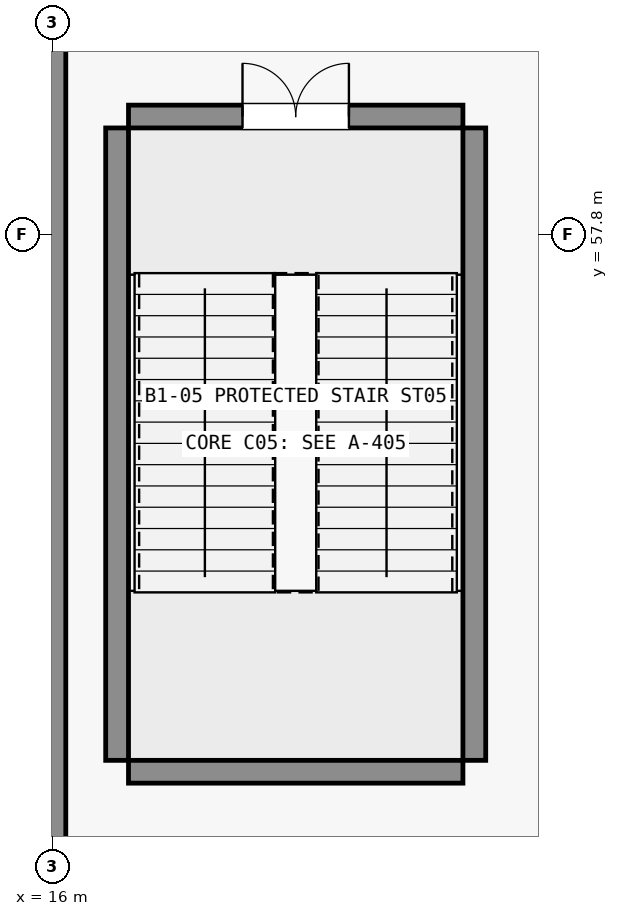
"""IFC4 building model, lengths in metres.
Left out: names, types, materials, properties, quantities, classifications, styles, units other than length and angle.
Written with IfcOpenShell. Run it as: python <this file> out.ifc"""

import sys

from ifc_helpers import new_model, si_unit, direction, frame, frame_2d, origin, place, context, subcontext, project, spatial, rectangle, extrude, element, fill, save


model = new_model("IFC4")
c1 = context("Model", 3, precision=1e-05, world=origin(), true_north=direction((0.0, 1.0)))
c2 = subcontext(c1, "Body", "Model", "MODEL_VIEW")
j1 = project(units=[si_unit("LENGTHUNIT", "METRE"), si_unit("PLANEANGLEUNIT", "RADIAN")], contexts=[c1])
p1 = place(None, origin())
s1 = spatial("IfcSite", under=j1, at=p1, CompositionType="ELEMENT")
p2 = place(p1, origin())
s2 = spatial("IfcBuilding", under=s1, at=p2, CompositionType="ELEMENT")
p3 = place(p2, frame((0.0, 0.0, -5.4)))
s3 = spatial("IfcBuildingStorey", under=s2, at=p3, CompositionType="ELEMENT", Elevation=-5.4)
p4 = place(p3, frame((17.0, 50.73, 0.0), z_axis=(0.0, 0.0, 1.0), x_axis=(1.0, 0.0, 0.0)))
e1 = element("IfcWall", 1, at=p4, inside=s3, PredefinedType="SHEAR", context=c2, shape_type="SweptSolid", body=[
    extrude(rectangle(XDim=4.4, YDim=0.3, at=frame_2d((2.2, 0.0))), origin(), (0.0, 0.0, 1.0), 5.4),
])
p5 = place(p3, frame((17.0, 59.35, 0.0), z_axis=(0.0, 0.0, 1.0), x_axis=(1.0, 0.0, 0.0)))
e2 = element("IfcWall", 2, at=p5, inside=s3, PredefinedType="SHEAR", context=c2, shape_type="SweptSolid", body=[
    extrude(rectangle(XDim=4.4, YDim=0.3, at=frame_2d((2.2, 0.0))), origin(), (0.0, 0.0, 1.0), 5.4),
])
p6 = place(p5, frame((1.5, 0.0, 0.0)))
e3 = element("IfcOpeningElement", 3, at=p6, cuts=e2, PredefinedType="OPENING", context=c2, shape_type="SweptSolid", body=[
    extrude(rectangle(XDim=1.4, YDim=2.2, at=frame_2d((0.7, 1.1))), frame((0.0, 0.16, 0.0), z_axis=(0.0, -1.0, 0.0), x_axis=(1.0, 0.0, 0.0)), (0.0, 0.0, 1.0), 0.32),
])
for number, where, z_axis, x_axis in (
    (4, (16.85, 50.88, 0.0), (0.0, 0.0, 1.0), (0.0, 1.0, 0.0)),
    (5, (21.55, 50.88, 0.0), (0.0, 0.0, 1.0), (0.0, 1.0, 0.0)),
):
    element("IfcWall", number, at=place(p3, frame(where, z_axis=z_axis, x_axis=x_axis)), inside=s3, PredefinedType="SHEAR", context=c2, shape_type="SweptSolid", body=[
        extrude(rectangle(XDim=8.32, YDim=0.3, at=frame_2d((4.16, 0.0))), origin(), (0.0, 0.0, 1.0), 5.4),
    ])
p7 = place(p3, frame((16.0, 95.3, 0.0), z_axis=(0.0, 0.0, 1.0), x_axis=(0.0, -1.0, 0.0)))
e6 = element("IfcWall", 6, at=p7, inside=s3, PredefinedType="SOLIDWALL", context=c2, shape_type="SweptSolid", body=[
    extrude(rectangle(XDim=62.4, YDim=0.35, at=frame_2d((31.2, 0.0))), origin(), (0.0, 0.0, 1.0), 4.96),
])
p8 = place(p6, origin())
e7 = element("IfcDoor", 7, at=p8, inside=s3, OperationType="DOUBLE_DOOR_SINGLE_SWING", PredefinedType="DOOR", context=c2, shape_type="SweptSolid", body=[
    extrude(rectangle(XDim=1.4, YDim=2.2, at=frame_2d((0.7, 1.1))), frame((0.0, 0.025, 0.0), z_axis=(0.0, -1.0, 0.0), x_axis=(1.0, 0.0, 0.0)), (0.0, 0.0, 1.0), 0.05),
])
fill(e3, e7)
save(model, sys.argv[1])
